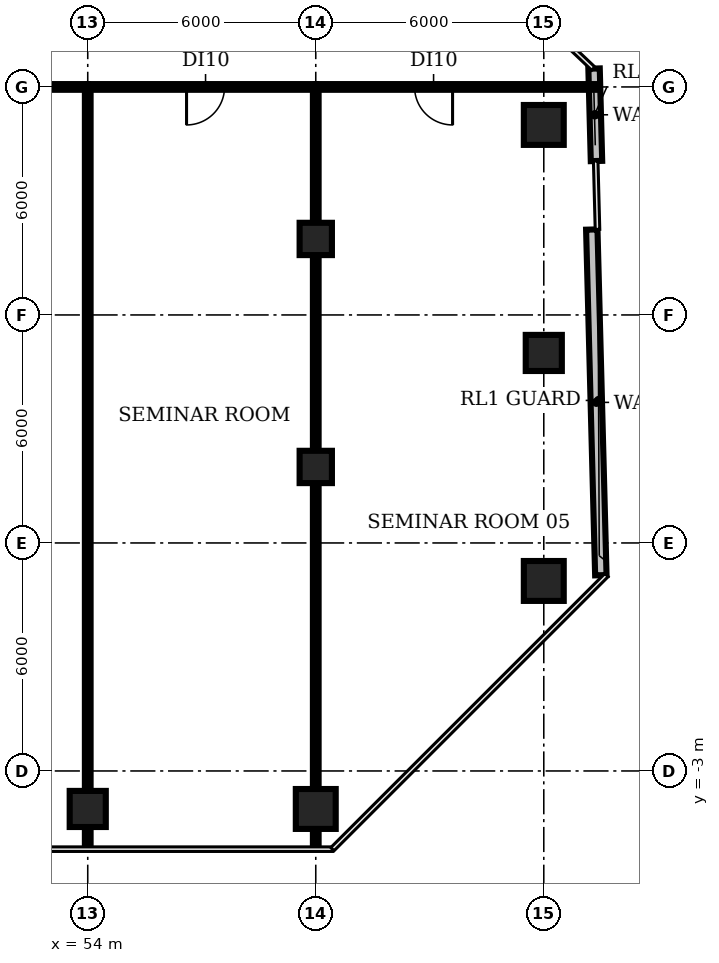
"""IFC4 building model, lengths in metres.
Left out: names, types, materials, properties, quantities, classifications, styles, units other than length and angle.
Written with IfcOpenShell. Run it as: python <this file> out.ifc"""

import sys

from ifc_helpers import new_model, si_unit, direction, frame, frame_2d, origin, origin_2d, place, context, subcontext, project, spatial, rectangle, circle, extrude, element, fill, save


model = new_model("IFC4")
c1 = context("Model", 3, precision=1e-05, world=origin(), true_north=direction((0.0, 1.0)))
c2 = subcontext(c1, "Body", "Model", "MODEL_VIEW")
j1 = project(units=[si_unit("LENGTHUNIT", "METRE"), si_unit("PLANEANGLEUNIT", "RADIAN")], contexts=[c1])
p1 = place(None, origin())
s1 = spatial("IfcSite", under=j1, at=p1, CompositionType="ELEMENT")
p2 = place(p1, origin())
s2 = spatial("IfcBuilding", under=s1, at=p2, CompositionType="ELEMENT")
p3 = place(p2, frame((0.0, 0.0, 58.4)))
s3 = spatial("IfcBuildingStorey", under=s2, at=p3, CompositionType="ELEMENT", Elevation=58.4)
p4 = place(p3, frame((54.0, -4.0, 0.0), z_axis=(0.0, 0.0, 1.0), x_axis=(1.0, 0.0, 0.0)))
e1 = element("IfcColumn", 1, at=p4, inside=s3, PredefinedType="COLUMN", context=c2, shape_type="SweptSolid", body=[
    extrude(rectangle(XDim=0.95, YDim=0.95, at=origin_2d()), origin(), (0.0, 0.0, 1.0), 3.85),
])
p5 = place(p3, frame((60.0, -4.0, 0.0), z_axis=(0.0, 0.0, 1.0), x_axis=(1.0, 0.0, 0.0)))
e2 = element("IfcColumn", 2, at=p5, inside=s3, PredefinedType="COLUMN", context=c2, shape_type="SweptSolid", body=[
    extrude(circle(Radius=0.525, at=origin_2d()), origin(), (0.0, 0.0, 1.0), 3.85),
])
for number, where, z_axis, x_axis in (
    (3, (60.0, 5.0, 0.0), (0.0, 0.0, 1.0), (1.0, 0.0, 0.0)),
    (4, (60.0, 11.0, 0.0), (0.0, 0.0, 1.0), (1.0, 0.0, 0.0)),
):
    element("IfcColumn", number, at=place(p3, frame(where, z_axis=z_axis, x_axis=x_axis)), inside=s3, PredefinedType="COLUMN", context=c2, shape_type="SweptSolid", body=[
        extrude(rectangle(XDim=0.85, YDim=0.85, at=origin_2d()), origin(), (0.0, 0.0, 1.0), 3.85),
    ])
p6 = place(p3, frame((66.0, 2.0, 0.0), z_axis=(0.0, 0.0, 1.0), x_axis=(1.0, 0.0, 0.0)))
e5 = element("IfcColumn", 5, at=p6, inside=s3, PredefinedType="COLUMN", context=c2, shape_type="SweptSolid", body=[
    extrude(circle(Radius=0.525, at=origin_2d()), origin(), (0.0, 0.0, 1.0), 3.85),
])
p7 = place(p3, frame((66.0, 8.0, 0.0), z_axis=(0.0, 0.0, 1.0), x_axis=(1.0, 0.0, 0.0)))
e6 = element("IfcColumn", 6, at=p7, inside=s3, PredefinedType="COLUMN", context=c2, shape_type="SweptSolid", body=[
    extrude(rectangle(XDim=0.95, YDim=0.95, at=origin_2d()), origin(), (0.0, 0.0, 1.0), 3.85),
])
p8 = place(p3, frame((66.0, 14.0, 0.0), z_axis=(0.0, 0.0, 1.0), x_axis=(1.0, 0.0, 0.0)))
e7 = element("IfcColumn", 7, at=p8, inside=s3, PredefinedType="COLUMN", context=c2, shape_type="SweptSolid", body=[
    extrude(circle(Radius=0.525, at=origin_2d()), origin(), (0.0, 0.0, 1.0), 3.85),
])
p9 = place(p3, frame((67.501, 2.151, 0.0), z_axis=(0.0, 0.0, 1.0), x_axis=(-0.026185328367, 0.999657105501, 0.0)))
e8 = element("IfcWall", 8, at=p9, inside=s3, PredefinedType="SOLIDWALL", context=c2, shape_type="SweptSolid", body=[
    extrude(rectangle(XDim=9.1, YDim=0.3, at=frame_2d((4.55, 0.0))), origin(), (0.0, 0.0, 1.0), 3.85),
])
p10 = place(p3, frame((67.387, 13.051, 0.0), z_axis=(0.0, 0.0, 1.0), x_axis=(-0.026187944058, 0.999657036981, 0.0)))
e9 = element("IfcWall", 9, at=p10, inside=s3, PredefinedType="SOLIDWALL", context=c2, shape_type="SweptSolid", body=[
    extrude(rectangle(XDim=2.433, YDim=0.3, at=frame_2d((1.217, 0.0))), origin(), (0.0, 0.0, 1.0), 3.85),
])
p11 = place(p3, frame((54.0, -4.993, 0.0), z_axis=(0.0, 0.0, 1.0), x_axis=(0.0, 1.0, 0.0)))
e10 = element("IfcWall", 10, at=p11, inside=s3, PredefinedType="PARTITIONING", context=c2, shape_type="SweptSolid", body=[
    extrude(rectangle(XDim=19.993, YDim=0.15, at=frame_2d((9.997, 0.0))), origin(), (0.0, 0.0, 1.0), 2.83),
])
p12 = place(p3, frame((54.0, 15.0, 0.0), z_axis=(0.0, 0.0, 1.0), x_axis=(-1.0, 0.0, 0.0)))
e11 = element("IfcWall", 11, at=p12, inside=s3, PredefinedType="PARTITIONING", context=c2, shape_type="SweptSolid", body=[
    extrude(rectangle(XDim=6.0, YDim=0.15, at=frame_2d((3.0, 0.0))), origin(), (0.0, 0.0, 1.0), 2.83),
])
p13 = place(p12, frame((2.4, 0.0, 0.0)))
e12 = element("IfcOpeningElement", 12, at=p13, cuts=e11, PredefinedType="OPENING", context=c2, shape_type="SweptSolid", body=[
    extrude(rectangle(XDim=1.0, YDim=2.1, at=frame_2d((0.5, 1.05))), frame((0.0, 0.085, 0.0), z_axis=(0.0, -1.0, 0.0), x_axis=(1.0, 0.0, 0.0)), (0.0, 0.0, 1.0), 0.17),
])
p14 = place(p3, frame((60.0, -5.01, 0.0), z_axis=(0.0, 0.0, 1.0), x_axis=(0.0, 1.0, 0.0)))
e13 = element("IfcWall", 13, at=p14, inside=s3, PredefinedType="PARTITIONING", context=c2, shape_type="SweptSolid", body=[
    extrude(rectangle(XDim=20.01, YDim=0.15, at=frame_2d((10.005, 0.0))), origin(), (0.0, 0.0, 1.0), 2.83),
])
p15 = place(p3, frame((60.0, 15.0, 0.0), z_axis=(0.0, 0.0, 1.0), x_axis=(-1.0, 0.0, 0.0)))
e14 = element("IfcWall", 14, at=p15, inside=s3, PredefinedType="PARTITIONING", context=c2, shape_type="SweptSolid", body=[
    extrude(rectangle(XDim=6.0, YDim=0.15, at=frame_2d((3.0, 0.0))), origin(), (0.0, 0.0, 1.0), 2.83),
])
p16 = place(p15, frame((2.4, 0.0, 0.0)))
e15 = element("IfcOpeningElement", 15, at=p16, cuts=e14, PredefinedType="OPENING", context=c2, shape_type="SweptSolid", body=[
    extrude(rectangle(XDim=1.0, YDim=2.1, at=frame_2d((0.5, 1.05))), frame((0.0, 0.085, 0.0), z_axis=(0.0, -1.0, 0.0), x_axis=(1.0, 0.0, 0.0)), (0.0, 0.0, 1.0), 0.17),
])
p17 = place(p3, frame((67.375, 15.0, 0.0), z_axis=(0.0, 0.0, 1.0), x_axis=(-1.0, 0.0, 0.0)))
e16 = element("IfcWall", 16, at=p17, inside=s3, PredefinedType="PARTITIONING", context=c2, shape_type="SweptSolid", body=[
    extrude(rectangle(XDim=7.375, YDim=0.15, at=frame_2d((3.688, 0.0))), origin(), (0.0, 0.0, 1.0), 2.83),
])
p18 = place(p17, frame((3.775, 0.0, 0.0)))
e17 = element("IfcOpeningElement", 17, at=p18, cuts=e16, PredefinedType="OPENING", context=c2, shape_type="SweptSolid", body=[
    extrude(rectangle(XDim=1.0, YDim=2.1, at=frame_2d((0.5, 1.05))), frame((0.0, 0.085, 0.0), z_axis=(0.0, -1.0, 0.0), x_axis=(1.0, 0.0, 0.0)), (0.0, 0.0, 1.0), 0.17),
])
p19 = place(p16, origin())
e18 = element("IfcDoor", 18, at=p19, inside=s3, OperationType="SINGLE_SWING_RIGHT", PredefinedType="DOOR", context=c2, shape_type="SweptSolid", body=[
    extrude(rectangle(XDim=1.0, YDim=2.1, at=frame_2d((0.5, 1.05))), frame((0.0, 0.025, 0.0), z_axis=(0.0, -1.0, 0.0), x_axis=(1.0, 0.0, 0.0)), (0.0, 0.0, 1.0), 0.05),
])
fill(e15, e18)
p20 = place(p18, origin())
e19 = element("IfcDoor", 19, at=p20, inside=s3, OperationType="SINGLE_SWING_LEFT", PredefinedType="DOOR", context=c2, shape_type="SweptSolid", body=[
    extrude(rectangle(XDim=1.0, YDim=2.1, at=frame_2d((0.5, 1.05))), frame((0.0, 0.025, 0.0), z_axis=(0.0, -1.0, 0.0), x_axis=(1.0, 0.0, 0.0)), (0.0, 0.0, 1.0), 0.05),
])
fill(e17, e19)
save(model, sys.argv[1])
